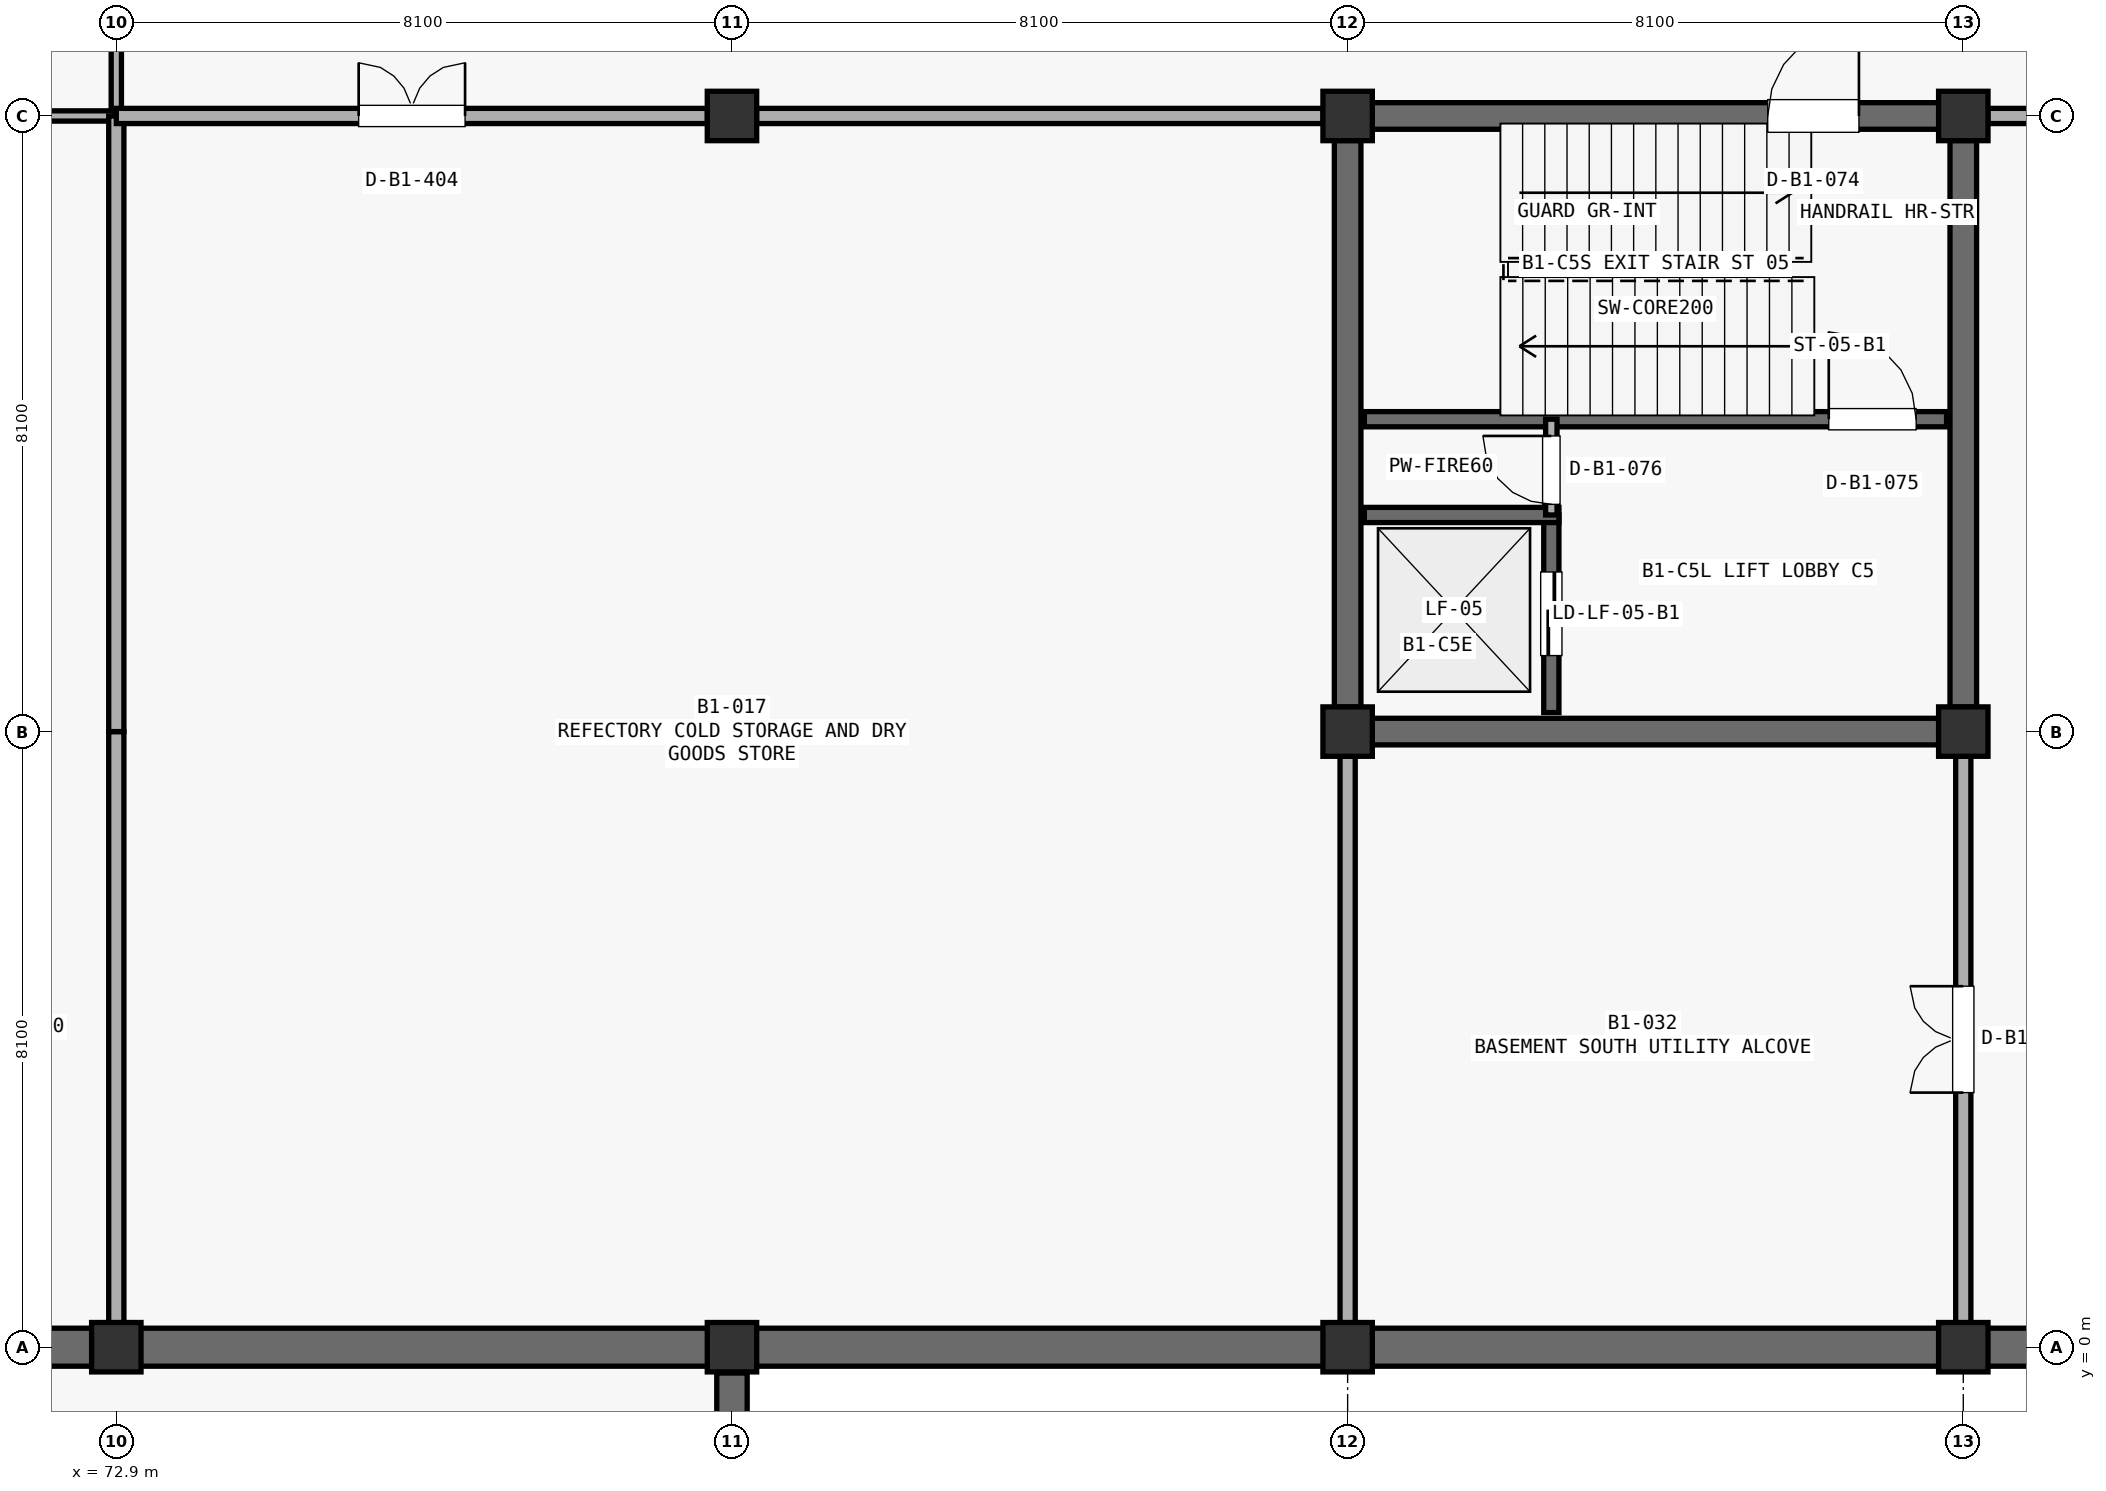
"""IFC4 building model, lengths in metres.
Left out: names, types, materials, properties, quantities, classifications, styles, units other than length and angle.
Written with IfcOpenShell. Run it as: python <this file> out.ifc"""

import sys

from ifc_helpers import new_model, si_unit, direction, frame, frame_2d, origin, origin_2d, place, context, subcontext, project, spatial, rectangle, extrude, element, fill, save


model = new_model("IFC4")
c1 = context("Model", 3, precision=1e-05, world=origin(), true_north=direction((0.0, 1.0)))
c2 = subcontext(c1, "Body", "Model", "MODEL_VIEW")
j1 = project(units=[si_unit("LENGTHUNIT", "METRE"), si_unit("PLANEANGLEUNIT", "RADIAN")], contexts=[c1])
p1 = place(None, origin())
s1 = spatial("IfcSite", under=j1, at=p1, CompositionType="ELEMENT")
p2 = place(p1, origin())
s2 = spatial("IfcBuilding", under=s1, at=p2, CompositionType="ELEMENT")
p3 = place(p2, frame((0.0, 0.0, -5.1)))
s3 = spatial("IfcBuildingStorey", under=s2, at=p3, CompositionType="ELEMENT", Elevation=-5.1)
for number, where, z_axis, x_axis in (
    (1, (72.9, 0.0, 0.0), (0.0, 0.0, 1.0), (1.0, 0.0, 0.0)),
    (2, (81.0, 0.0, 0.0), (0.0, 0.0, 1.0), (1.0, 0.0, 0.0)),
    (3, (81.0, 8.1, 0.0), (0.0, 0.0, 1.0), (1.0, 0.0, 0.0)),
    (4, (81.0, 16.2, 0.0), (0.0, 0.0, 1.0), (1.0, 0.0, 0.0)),
    (5, (89.1, 0.0, 0.0), (0.0, 0.0, 1.0), (1.0, 0.0, 0.0)),
    (6, (89.1, 8.1, 0.0), (0.0, 0.0, 1.0), (1.0, 0.0, 0.0)),
    (7, (89.1, 16.2, 0.0), (0.0, 0.0, 1.0), (1.0, 0.0, 0.0)),
    (8, (97.2, 0.0, 0.0), (0.0, 0.0, 1.0), (1.0, 0.0, 0.0)),
    (9, (97.2, 8.1, 0.0), (0.0, 0.0, 1.0), (1.0, 0.0, 0.0)),
    (10, (97.2, 16.2, 0.0), (0.0, 0.0, 1.0), (1.0, 0.0, 0.0)),
):
    element("IfcColumn", number, at=place(p3, frame(where, z_axis=z_axis, x_axis=x_axis)), inside=s3, PredefinedType="COLUMN", context=c2, shape_type="SweptSolid", body=[
        extrude(rectangle(XDim=0.65, YDim=0.65, at=origin_2d()), origin(), (0.0, 0.0, 1.0), 5.1),
    ])
p4 = place(p3, frame((65.11, 0.0, 0.0), z_axis=(0.0, 0.0, 1.0), x_axis=(1.0, 0.0, 0.0)))
e11 = element("IfcWall", 11, at=p4, inside=s3, PredefinedType="SOLIDWALL", context=c2, shape_type="SweptSolid", body=[
    extrude(rectangle(XDim=7.48, YDim=0.5, at=frame_2d((3.74, 0.0))), origin(), (0.0, 0.0, 1.0), 4.514),
])
p5 = place(p3, frame((73.21, 0.0, 0.0), z_axis=(0.0, 0.0, 1.0), x_axis=(1.0, 0.0, 0.0)))
e12 = element("IfcWall", 12, at=p5, inside=s3, PredefinedType="SOLIDWALL", context=c2, shape_type="SweptSolid", body=[
    extrude(rectangle(XDim=7.48, YDim=0.5, at=frame_2d((3.74, 0.0))), origin(), (0.0, 0.0, 1.0), 4.365),
])
p6 = place(p3, frame((81.31, 0.0, 0.0), z_axis=(0.0, 0.0, 1.0), x_axis=(1.0, 0.0, 0.0)))
e13 = element("IfcWall", 13, at=p6, inside=s3, PredefinedType="SOLIDWALL", context=c2, shape_type="SweptSolid", body=[
    extrude(rectangle(XDim=7.48, YDim=0.5, at=frame_2d((3.74, 0.0))), origin(), (0.0, 0.0, 1.0), 4.191),
])
p7 = place(p3, frame((89.41, 0.0, 0.0), z_axis=(0.0, 0.0, 1.0), x_axis=(1.0, 0.0, 0.0)))
e14 = element("IfcWall", 14, at=p7, inside=s3, PredefinedType="SOLIDWALL", context=c2, shape_type="SweptSolid", body=[
    extrude(rectangle(XDim=7.48, YDim=0.5, at=frame_2d((3.74, 0.0))), origin(), (0.0, 0.0, 1.0), 4.207),
])
p8 = place(p3, frame((97.51, 0.0, 0.0), z_axis=(0.0, 0.0, 1.0), x_axis=(1.0, 0.0, 0.0)))
e15 = element("IfcWall", 15, at=p8, inside=s3, PredefinedType="SOLIDWALL", context=c2, shape_type="SweptSolid", body=[
    extrude(rectangle(XDim=7.48, YDim=0.5, at=frame_2d((3.74, 0.0))), origin(), (0.0, 0.0, 1.0), 4.09),
])
p9 = place(p3, frame((81.0, -11.46, 0.0), z_axis=(0.0, 0.0, 1.0), x_axis=(0.0, 1.0, 0.0)))
e16 = element("IfcWall", 16, at=p9, inside=s3, PredefinedType="SOLIDWALL", context=c2, shape_type="SweptSolid", body=[
    extrude(rectangle(XDim=11.12, YDim=0.4, at=frame_2d((5.56, 0.0))), origin(), (0.0, 0.0, 1.0), 4.78),
])
p10 = place(p3, frame((89.423, 16.2, 0.0), z_axis=(0.0, 0.0, 1.0), x_axis=(1.0, 0.0, 0.0)))
e17 = element("IfcWall", 17, at=p10, inside=s3, PredefinedType="SHEAR", context=c2, shape_type="SweptSolid", body=[
    extrude(rectangle(XDim=7.454, YDim=0.35, at=frame_2d((3.727, 0.0))), origin(), (0.0, 0.0, 1.0), 4.742),
])
p11 = place(p10, frame((5.204, 0.0, 0.0)))
e18 = element("IfcOpeningElement", 18, at=p11, cuts=e17, PredefinedType="OPENING", context=c2, shape_type="SweptSolid", body=[
    extrude(rectangle(XDim=1.2, YDim=2.2, at=frame_2d((0.6, 1.1))), frame((0.0, 0.185, 0.0), z_axis=(0.0, -1.0, 0.0), x_axis=(1.0, 0.0, 0.0)), (0.0, 0.0, 1.0), 0.37),
])
for number, where, z_axis, x_axis in (
    (19, (89.1, 8.423, 0.0), (0.0, 0.0, 1.0), (0.0, 1.0, 0.0)),
    (20, (97.2, 8.423, 0.0), (0.0, 0.0, 1.0), (0.0, 1.0, 0.0)),
    (21, (89.423, 8.1, 0.0), (0.0, 0.0, 1.0), (1.0, 0.0, 0.0)),
):
    element("IfcWall", number, at=place(p3, frame(where, z_axis=z_axis, x_axis=x_axis)), inside=s3, PredefinedType="SHEAR", context=c2, shape_type="SweptSolid", body=[
        extrude(rectangle(XDim=7.454, YDim=0.35, at=frame_2d((3.727, 0.0))), origin(), (0.0, 0.0, 1.0), 4.742),
    ])
p12 = place(p3, frame((89.32, 12.21, 0.0), z_axis=(0.0, 0.0, 1.0), x_axis=(1.0, 0.0, 0.0)))
e22 = element("IfcWall", 22, at=p12, inside=s3, PredefinedType="SHEAR", context=c2, shape_type="SweptSolid", body=[
    extrude(rectangle(XDim=7.66, YDim=0.2, at=frame_2d((3.83, 0.0))), origin(), (0.0, 0.0, 1.0), 4.742),
])
p13 = place(p12, frame((6.11, 0.0, 0.0)))
e23 = element("IfcOpeningElement", 23, at=p13, cuts=e22, PredefinedType="OPENING", context=c2, shape_type="SweptSolid", body=[
    extrude(rectangle(XDim=1.15, YDim=2.2, at=frame_2d((0.575, 1.1))), frame((0.0, 0.11, 0.0), z_axis=(0.0, -1.0, 0.0), x_axis=(1.0, 0.0, 0.0)), (0.0, 0.0, 1.0), 0.22),
])
p14 = place(p3, frame((91.78, 8.35, 0.0), z_axis=(0.0, 0.0, 1.0), x_axis=(0.0, 1.0, 0.0)))
e24 = element("IfcWall", 24, at=p14, inside=s3, PredefinedType="SHEAR", context=c2, shape_type="SweptSolid", body=[
    extrude(rectangle(XDim=2.6, YDim=0.2, at=frame_2d((1.3, 0.0))), origin(), (0.0, 0.0, 1.0), 4.742),
])
p15 = place(p14, frame((0.75, 0.0, 0.0)))
e25 = element("IfcOpeningElement", 25, at=p15, cuts=e24, PredefinedType="OPENING", context=c2, shape_type="SweptSolid", body=[
    extrude(rectangle(XDim=1.1, YDim=2.2, at=frame_2d((0.55, 1.1))), frame((0.0, 0.11, 0.0), z_axis=(0.0, -1.0, 0.0), x_axis=(1.0, 0.0, 0.0)), (0.0, 0.0, 1.0), 0.22),
])
p16 = place(p3, frame((89.32, 10.95, 0.0), z_axis=(0.0, 0.0, 1.0), x_axis=(1.0, 0.0, 0.0)))
e26 = element("IfcWall", 26, at=p16, inside=s3, PredefinedType="SHEAR", context=c2, shape_type="SweptSolid", body=[
    extrude(rectangle(XDim=2.56, YDim=0.2, at=frame_2d((1.28, 0.0))), origin(), (0.0, 0.0, 1.0), 4.742),
])
p17 = place(p3, frame((91.78, 10.95, 0.0), z_axis=(0.0, 0.0, 1.0), x_axis=(0.0, 1.0, 0.0)))
e27 = element("IfcWall", 27, at=p17, inside=s3, PredefinedType="PARTITIONING", context=c2, shape_type="SweptSolid", body=[
    extrude(rectangle(XDim=1.26, YDim=0.15, at=frame_2d((0.63, 0.0))), origin(), (0.0, 0.0, 1.0), 4.742),
])
p18 = place(p17, frame((0.14, 0.0, 0.0)))
e28 = element("IfcOpeningElement", 28, at=p18, cuts=e27, PredefinedType="OPENING", context=c2, shape_type="SweptSolid", body=[
    extrude(rectangle(XDim=0.9, YDim=2.15, at=frame_2d((0.45, 1.075))), frame((0.0, 0.085, 0.0), z_axis=(0.0, -1.0, 0.0), x_axis=(1.0, 0.0, 0.0)), (0.0, 0.0, 1.0), 0.17),
])
p19 = place(p3, frame((72.9, 16.2, 0.0), z_axis=(0.0, 0.0, 1.0), x_axis=(0.0, 1.0, 0.0)))
e29 = element("IfcWall", 29, at=p19, inside=s3, PredefinedType="PARTITIONING", context=c2, shape_type="SweptSolid", body=[
    extrude(rectangle(XDim=7.777, YDim=0.135, at=frame_2d((3.889, 0.0))), origin(), (0.0, 0.0, 1.0), 4.782),
])
p20 = place(p3, frame((65.123, 16.2, 0.0), z_axis=(0.0, 0.0, 1.0), x_axis=(1.0, 0.0, 0.0)))
e30 = element("IfcWall", 30, at=p20, inside=s3, PredefinedType="PARTITIONING", context=c2, shape_type="SweptSolid", body=[
    extrude(rectangle(XDim=7.777, YDim=0.135, at=frame_2d((3.888, 0.0))), origin(), (0.0, 0.0, 1.0), 4.782),
])
p21 = place(p3, frame((72.9, 0.323, 0.0), z_axis=(0.0, 0.0, 1.0), x_axis=(0.0, 1.0, 0.0)))
e31 = element("IfcWall", 31, at=p21, inside=s3, PredefinedType="PARTITIONING", context=c2, shape_type="SweptSolid", body=[
    extrude(rectangle(XDim=7.777, YDim=0.2, at=frame_2d((3.889, 0.0))), origin(), (0.0, 0.0, 1.0), 4.782),
])
p22 = place(p3, frame((72.9, 8.1, 0.0), z_axis=(0.0, 0.0, 1.0), x_axis=(0.0, 1.0, 0.0)))
e32 = element("IfcWall", 32, at=p22, inside=s3, PredefinedType="PARTITIONING", context=c2, shape_type="SweptSolid", body=[
    extrude(rectangle(XDim=8.1, YDim=0.2, at=frame_2d((4.05, 0.0))), origin(), (0.0, 0.0, 1.0), 4.782),
])
p23 = place(p3, frame((72.9, 16.2, 0.0), z_axis=(0.0, 0.0, 1.0), x_axis=(1.0, 0.0, 0.0)))
e33 = element("IfcWall", 33, at=p23, inside=s3, PredefinedType="PARTITIONING", context=c2, shape_type="SweptSolid", body=[
    extrude(rectangle(XDim=7.777, YDim=0.2, at=frame_2d((3.889, 0.0))), origin(), (0.0, 0.0, 1.0), 4.782),
])
p24 = place(p23, frame((3.188, 0.0, 0.0)))
e34 = element("IfcOpeningElement", 34, at=p24, cuts=e33, PredefinedType="OPENING", context=c2, shape_type="SweptSolid", body=[
    extrude(rectangle(XDim=1.4, YDim=2.2, at=frame_2d((0.7, 1.1))), frame((0.0, 0.11, 0.0), z_axis=(0.0, -1.0, 0.0), x_axis=(1.0, 0.0, 0.0)), (0.0, 0.0, 1.0), 0.22),
])
p25 = place(p3, frame((81.323, 16.2, 0.0), z_axis=(0.0, 0.0, 1.0), x_axis=(1.0, 0.0, 0.0)))
e35 = element("IfcWall", 35, at=p25, inside=s3, PredefinedType="PARTITIONING", context=c2, shape_type="SweptSolid", body=[
    extrude(rectangle(XDim=7.454, YDim=0.2, at=frame_2d((3.727, 0.0))), origin(), (0.0, 0.0, 1.0), 4.279),
])
p26 = place(p3, frame((89.1, 0.323, 0.0), z_axis=(0.0, 0.0, 1.0), x_axis=(0.0, 1.0, 0.0)))
e36 = element("IfcWall", 36, at=p26, inside=s3, PredefinedType="PARTITIONING", context=c2, shape_type="SweptSolid", body=[
    extrude(rectangle(XDim=7.454, YDim=0.2, at=frame_2d((3.727, 0.0))), origin(), (0.0, 0.0, 1.0), 4.209),
])
p27 = place(p3, frame((97.523, 16.2, 0.0), z_axis=(0.0, 0.0, 1.0), x_axis=(1.0, 0.0, 0.0)))
e37 = element("IfcWall", 37, at=p27, inside=s3, PredefinedType="PARTITIONING", context=c2, shape_type="SweptSolid", body=[
    extrude(rectangle(XDim=7.454, YDim=0.2, at=frame_2d((3.727, 0.0))), origin(), (0.0, 0.0, 1.0), 4.332),
])
p28 = place(p27, frame((3.027, 0.0, 0.0)))
e38 = element("IfcOpeningElement", 38, at=p28, cuts=e37, PredefinedType="OPENING", context=c2, shape_type="SweptSolid", body=[
    extrude(rectangle(XDim=1.4, YDim=2.2, at=frame_2d((0.7, 1.1))), frame((0.0, 0.11, 0.0), z_axis=(0.0, -1.0, 0.0), x_axis=(1.0, 0.0, 0.0)), (0.0, 0.0, 1.0), 0.22),
])
p29 = place(p3, frame((97.2, 0.323, 0.0), z_axis=(0.0, 0.0, 1.0), x_axis=(0.0, 1.0, 0.0)))
e39 = element("IfcWall", 39, at=p29, inside=s3, PredefinedType="PARTITIONING", context=c2, shape_type="SweptSolid", body=[
    extrude(rectangle(XDim=7.454, YDim=0.2, at=frame_2d((3.727, 0.0))), origin(), (0.0, 0.0, 1.0), 4.279),
])
p30 = place(p29, frame((3.027, 0.0, 0.0)))
e40 = element("IfcOpeningElement", 40, at=p30, cuts=e39, PredefinedType="OPENING", context=c2, shape_type="SweptSolid", body=[
    extrude(rectangle(XDim=1.4, YDim=2.2, at=frame_2d((0.7, 1.1))), frame((0.0, 0.11, 0.0), z_axis=(0.0, -1.0, 0.0), x_axis=(1.0, 0.0, 0.0)), (0.0, 0.0, 1.0), 0.22),
])
p31 = place(p11, origin())
e41 = element("IfcDoor", 41, at=p31, inside=s3, OperationType="SINGLE_SWING_RIGHT", PredefinedType="DOOR", context=c2, shape_type="SweptSolid", body=[
    extrude(rectangle(XDim=1.2, YDim=2.2, at=frame_2d((0.6, 1.1))), frame((0.0, 0.025, 0.0), z_axis=(0.0, -1.0, 0.0), x_axis=(1.0, 0.0, 0.0)), (0.0, 0.0, 1.0), 0.05),
])
fill(e18, e41)
p32 = place(p13, origin())
e42 = element("IfcDoor", 42, at=p32, inside=s3, OperationType="SINGLE_SWING_LEFT", PredefinedType="DOOR", context=c2, shape_type="SweptSolid", body=[
    extrude(rectangle(XDim=1.15, YDim=2.2, at=frame_2d((0.575, 1.1))), frame((0.0, 0.025, 0.0), z_axis=(0.0, -1.0, 0.0), x_axis=(1.0, 0.0, 0.0)), (0.0, 0.0, 1.0), 0.05),
])
fill(e23, e42)
p33 = place(p15, origin())
e43 = element("IfcDoor", 43, at=p33, inside=s3, OperationType="SLIDING_TO_LEFT", PredefinedType="DOOR", context=c2, shape_type="SweptSolid", body=[
    extrude(rectangle(XDim=1.1, YDim=2.2, at=frame_2d((0.55, 1.1))), frame((0.0, 0.025, 0.0), z_axis=(0.0, -1.0, 0.0), x_axis=(1.0, 0.0, 0.0)), (0.0, 0.0, 1.0), 0.05),
])
fill(e25, e43)
p34 = place(p18, origin())
e44 = element("IfcDoor", 44, at=p34, inside=s3, OperationType="SINGLE_SWING_RIGHT", PredefinedType="DOOR", context=c2, shape_type="SweptSolid", body=[
    extrude(rectangle(XDim=0.9, YDim=2.15, at=frame_2d((0.45, 1.075))), frame((0.0, 0.025, 0.0), z_axis=(0.0, -1.0, 0.0), x_axis=(1.0, 0.0, 0.0)), (0.0, 0.0, 1.0), 0.05),
])
fill(e28, e44)
p35 = place(p24, origin())
e45 = element("IfcDoor", 45, at=p35, inside=s3, OperationType="DOUBLE_SWING_LEFT", PredefinedType="DOOR", context=c2, shape_type="SweptSolid", body=[
    extrude(rectangle(XDim=1.4, YDim=2.2, at=frame_2d((0.7, 1.1))), frame((0.0, 0.025, 0.0), z_axis=(0.0, -1.0, 0.0), x_axis=(1.0, 0.0, 0.0)), (0.0, 0.0, 1.0), 0.05),
])
fill(e34, e45)
p36 = place(p30, origin())
e46 = element("IfcDoor", 46, at=p36, inside=s3, OperationType="DOUBLE_SWING_LEFT", PredefinedType="DOOR", context=c2, shape_type="SweptSolid", body=[
    extrude(rectangle(XDim=1.4, YDim=2.2, at=frame_2d((0.7, 1.1))), frame((0.0, 0.025, 0.0), z_axis=(0.0, -1.0, 0.0), x_axis=(1.0, 0.0, 0.0)), (0.0, 0.0, 1.0), 0.05),
])
fill(e40, e46)
save(model, sys.argv[1])
